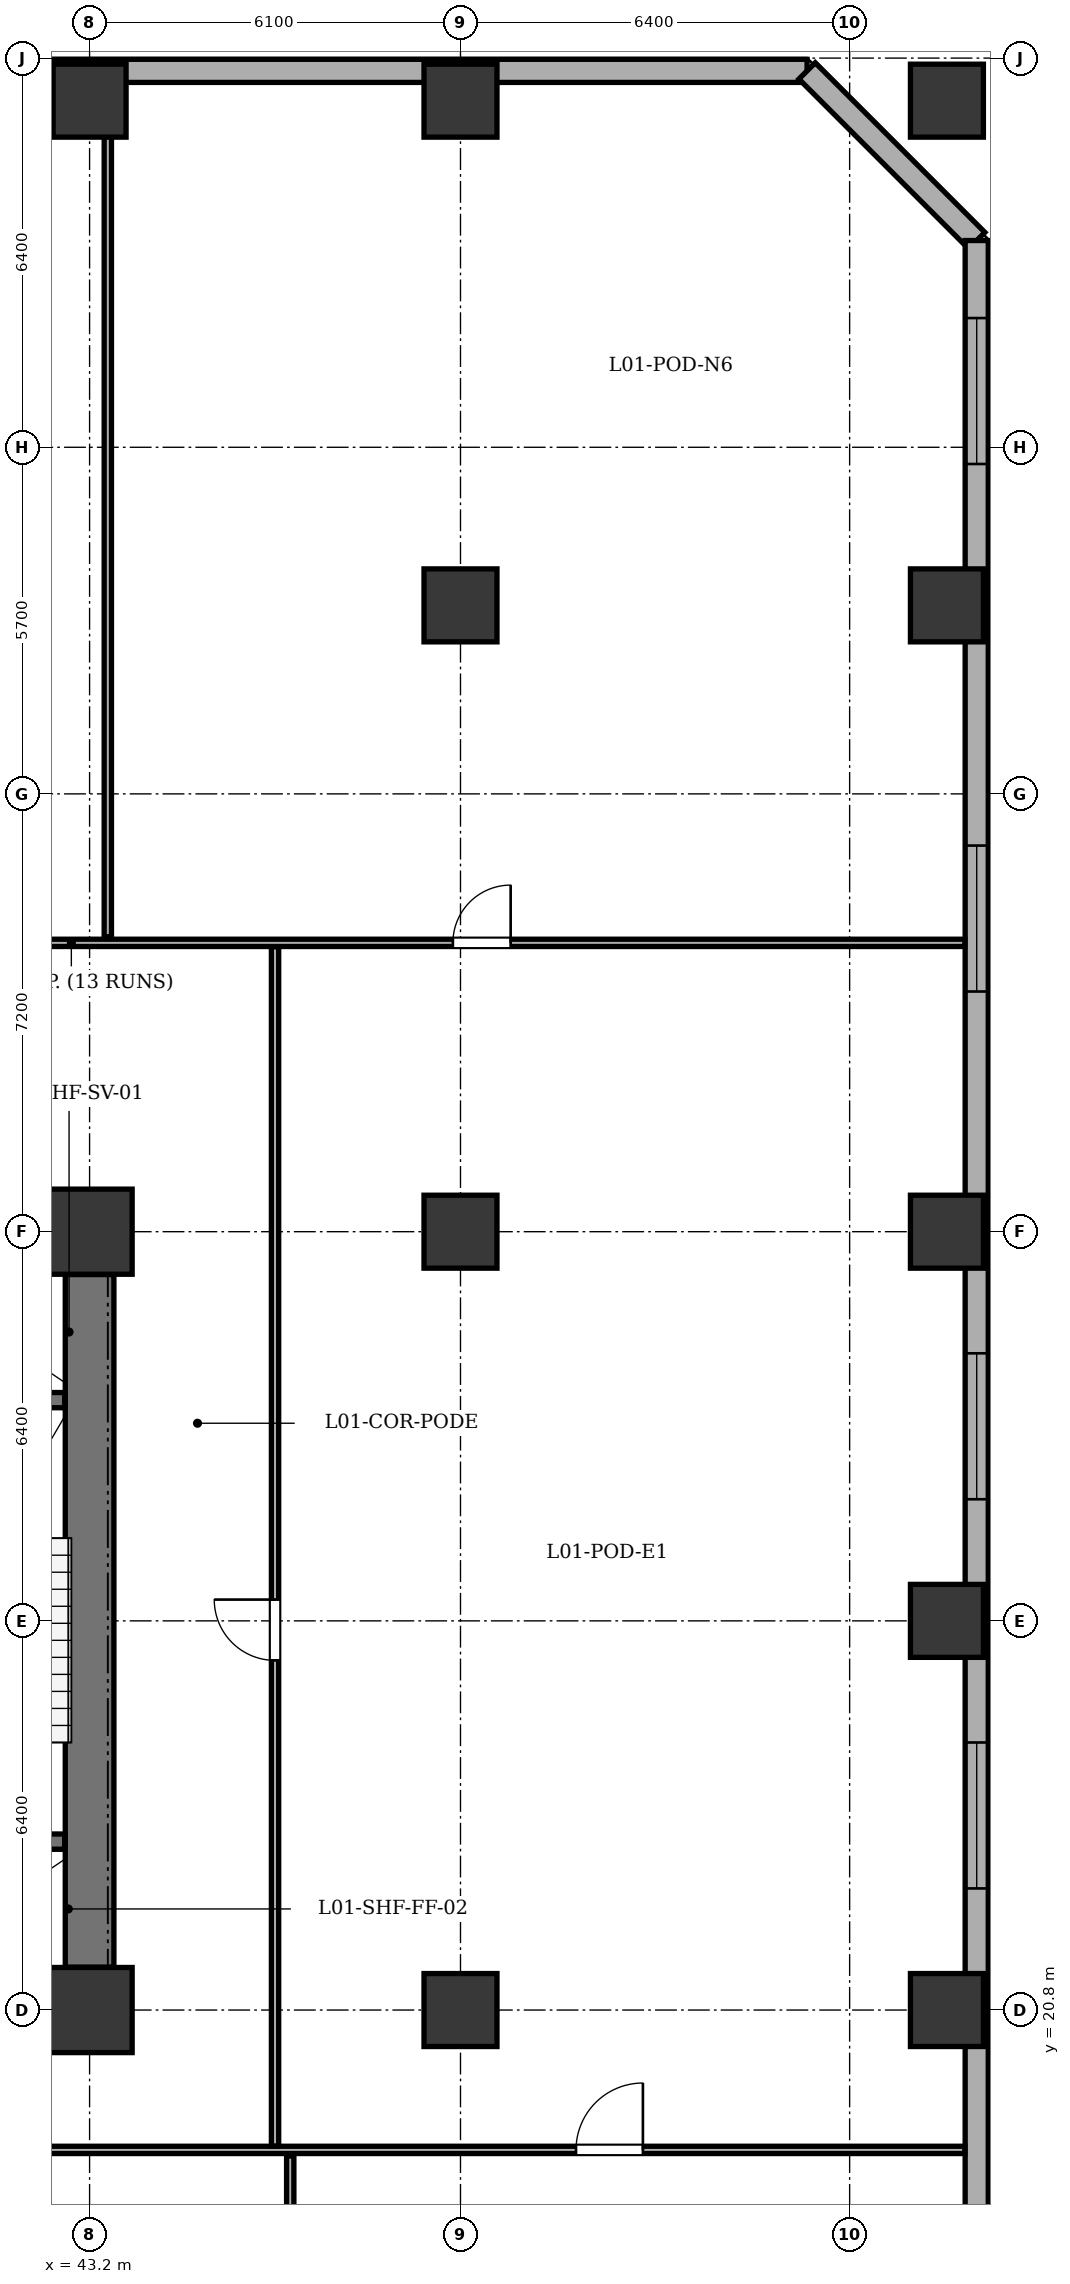
"""IFC4 building model, lengths in metres.
Left out: names, types, materials, properties, quantities, classifications, styles, units other than length and angle.
Written with IfcOpenShell. Run it as: python <this file> out.ifc"""

import sys

from ifc_helpers import new_model, si_unit, direction, frame, frame_2d, origin, origin_2d, place, context, subcontext, project, spatial, rectangle, extrude, element, fill, save


model = new_model("IFC4")
c1 = context("Model", 3, precision=1e-05, world=origin(), true_north=direction((0.0, 1.0)))
c2 = subcontext(c1, "Body", "Model", "MODEL_VIEW")
j1 = project(units=[si_unit("LENGTHUNIT", "METRE"), si_unit("PLANEANGLEUNIT", "RADIAN")], contexts=[c1])
p1 = place(None, origin())
s1 = spatial("IfcSite", under=j1, at=p1, CompositionType="ELEMENT")
p2 = place(p1, origin())
s2 = spatial("IfcBuilding", under=s1, at=p2, CompositionType="ELEMENT")
p3 = place(p2, frame((0.0, 0.0, 5.4)))
s3 = spatial("IfcBuildingStorey", under=s2, at=p3, CompositionType="ELEMENT", Elevation=5.4)
for number, where, z_axis, x_axis in (
    (1, (43.2, 20.8, 0.0), (0.0, 0.0, 1.0), (1.0, 0.0, 0.0)),
    (2, (43.2, 33.6, 0.0), (0.0, 0.0, 1.0), (1.0, 0.0, 0.0)),
):
    element("IfcColumn", number, at=place(p3, frame(where, z_axis=z_axis, x_axis=x_axis)), inside=s3, PredefinedType="COLUMN", context=c2, shape_type="SweptSolid", body=[
        extrude(rectangle(XDim=1.4, YDim=1.4, at=origin_2d()), origin(), (0.0, 0.0, 1.0), 4.5),
    ])
for number, where, z_axis, x_axis in (
    (3, (43.2, 52.2, 0.0), (0.0, 0.0, 1.0), (1.0, 0.0, 0.0)),
    (4, (49.3, 52.2, 0.0), (0.0, 0.0, 1.0), (1.0, 0.0, 0.0)),
    (5, (57.3, 52.2, 0.0), (0.0, 0.0, 1.0), (1.0, 0.0, 0.0)),
    (6, (57.3, 20.8, 0.0), (0.0, 0.0, 1.0), (1.0, 0.0, 0.0)),
    (7, (57.3, 27.2, 0.0), (0.0, 0.0, 1.0), (1.0, 0.0, 0.0)),
    (8, (57.3, 33.6, 0.0), (0.0, 0.0, 1.0), (1.0, 0.0, 0.0)),
    (9, (57.3, 43.9, 0.0), (0.0, 0.0, 1.0), (1.0, 0.0, 0.0)),
    (10, (49.3, 20.8, 0.0), (0.0, 0.0, 1.0), (1.0, 0.0, 0.0)),
    (11, (49.3, 33.6, 0.0), (0.0, 0.0, 1.0), (1.0, 0.0, 0.0)),
    (12, (49.3, 43.9, 0.0), (0.0, 0.0, 1.0), (1.0, 0.0, 0.0)),
):
    element("IfcColumn", number, at=place(p3, frame(where, z_axis=z_axis, x_axis=x_axis)), inside=s3, PredefinedType="COLUMN", context=c2, shape_type="SweptSolid", body=[
        extrude(rectangle(XDim=1.2, YDim=1.2, at=origin_2d()), origin(), (0.0, 0.0, 1.0), 4.5),
    ])
p4 = place(p3, frame((26.05, 52.69, 0.0), z_axis=(0.0, 0.0, 1.0), x_axis=(1.0, 0.0, 0.0)))
e13 = element("IfcWall", 13, at=p4, inside=s3, PredefinedType="STANDARD", context=c2, shape_type="SweptSolid", body=[
    extrude(rectangle(XDim=28.95, YDim=0.38, at=frame_2d((14.475, 0.0))), origin(), (0.0, 0.0, 1.0), 4.18),
])
p5 = place(p3, frame((55.0, 52.69, 0.0), z_axis=(0.0, 0.0, 1.0), x_axis=(0.707106781187, -0.707106781187, 0.0)))
e14 = element("IfcWall", 14, at=p5, inside=s3, PredefinedType="STANDARD", context=c2, shape_type="SweptSolid", body=[
    extrude(rectangle(XDim=3.946, YDim=0.38, at=frame_2d((1.973, 0.0))), origin(), (0.0, 0.0, 1.0), 4.18),
])
p6 = place(p3, frame((57.79, 49.9, 0.0), z_axis=(0.0, 0.0, 1.0), x_axis=(0.0, -1.0, 0.0)))
e15 = element("IfcWall", 15, at=p6, inside=s3, PredefinedType="STANDARD", context=c2, shape_type="SweptSolid", body=[
    extrude(rectangle(XDim=45.4, YDim=0.38, at=frame_2d((22.7, 0.0))), origin(), (0.0, 0.0, 1.0), 4.18),
])
p7 = place(p6, frame((1.275, 0.0, 0.75)))
e16 = element("IfcOpeningElement", 16, at=p7, cuts=e15, PredefinedType="OPENING", context=c2, shape_type="SweptSolid", body=[
    extrude(rectangle(XDim=2.4, YDim=2.1, at=frame_2d((1.2, 1.05))), frame((0.0, 0.2, 0.0), z_axis=(0.0, -1.0, 0.0), x_axis=(1.0, 0.0, 0.0)), (0.0, 0.0, 1.0), 0.4),
])
p8 = place(p6, frame((9.95, 0.0, 0.75)))
e17 = element("IfcOpeningElement", 17, at=p8, cuts=e15, PredefinedType="OPENING", context=c2, shape_type="SweptSolid", body=[
    extrude(rectangle(XDim=2.4, YDim=2.1, at=frame_2d((1.2, 1.05))), frame((0.0, 0.2, 0.0), z_axis=(0.0, -1.0, 0.0), x_axis=(1.0, 0.0, 0.0)), (0.0, 0.0, 1.0), 0.4),
])
p9 = place(p6, frame((18.3, 0.0, 0.75)))
e18 = element("IfcOpeningElement", 18, at=p9, cuts=e15, PredefinedType="OPENING", context=c2, shape_type="SweptSolid", body=[
    extrude(rectangle(XDim=2.4, YDim=2.1, at=frame_2d((1.2, 1.05))), frame((0.0, 0.2, 0.0), z_axis=(0.0, -1.0, 0.0), x_axis=(1.0, 0.0, 0.0)), (0.0, 0.0, 1.0), 0.4),
])
p10 = place(p6, frame((24.7, 0.0, 0.75)))
e19 = element("IfcOpeningElement", 19, at=p10, cuts=e15, PredefinedType="OPENING", context=c2, shape_type="SweptSolid", body=[
    extrude(rectangle(XDim=2.4, YDim=2.1, at=frame_2d((1.2, 1.05))), frame((0.0, 0.2, 0.0), z_axis=(0.0, -1.0, 0.0), x_axis=(1.0, 0.0, 0.0)), (0.0, 0.0, 1.0), 0.4),
])
p11 = place(p6, frame((33.05, 0.0, 0.75)))
e20 = element("IfcOpeningElement", 20, at=p11, cuts=e15, PredefinedType="OPENING", context=c2, shape_type="SweptSolid", body=[
    extrude(rectangle(XDim=2.4, YDim=2.1, at=frame_2d((1.2, 1.05))), frame((0.0, 0.2, 0.0), z_axis=(0.0, -1.0, 0.0), x_axis=(1.0, 0.0, 0.0)), (0.0, 0.0, 1.0), 0.4),
])
p12 = place(p6, frame((41.725, 0.0, 0.75)))
e21 = element("IfcOpeningElement", 21, at=p12, cuts=e15, PredefinedType="OPENING", context=c2, shape_type="SweptSolid", body=[
    extrude(rectangle(XDim=2.4, YDim=2.1, at=frame_2d((1.2, 1.05))), frame((0.0, 0.2, 0.0), z_axis=(0.0, -1.0, 0.0), x_axis=(1.0, 0.0, 0.0)), (0.0, 0.0, 1.0), 0.4),
])
p13 = place(p3, frame((43.2, 21.505, 0.0), z_axis=(0.0, 0.0, 1.0), x_axis=(0.0, 1.0, 0.0)))
e22 = element("IfcWall", 22, at=p13, inside=s3, PredefinedType="SHEAR", context=c2, shape_type="SweptSolid", body=[
    extrude(rectangle(XDim=11.39, YDim=0.8, at=frame_2d((5.695, 0.0))), origin(), (0.0, 0.0, 1.0), 4.18),
])
for number, where, z_axis, x_axis in (
    (23, (39.69, 23.57, 0.0), (0.0, 0.0, 1.0), (1.0, 0.0, 0.0)),
    (24, (39.69, 30.83, 0.0), (0.0, 0.0, 1.0), (1.0, 0.0, 0.0)),
):
    element("IfcWall", number, at=place(p3, frame(where, z_axis=z_axis, x_axis=x_axis)), inside=s3, PredefinedType="SHEAR", context=c2, shape_type="SweptSolid", body=[
        extrude(rectangle(XDim=3.1, YDim=0.25, at=frame_2d((1.55, 0.0))), origin(), (0.0, 0.0, 1.0), 4.18),
    ])
p14 = place(p3, frame((26.015, 18.5, 0.0), z_axis=(0.0, 0.0, 1.0), x_axis=(1.0, 0.0, 0.0)))
e25 = element("IfcWall", 25, at=p14, inside=s3, PredefinedType="PARTITIONING", context=c2, shape_type="SweptSolid", body=[
    extrude(rectangle(XDim=31.58, YDim=0.12, at=frame_2d((15.79, 0.0))), origin(), (0.0, 0.0, 1.0), 3.665),
])
p15 = place(p14, frame((4.36, 0.0, 0.0)))
e26 = element("IfcOpeningElement", 26, at=p15, cuts=e25, PredefinedType="OPENING", context=c2, shape_type="SweptSolid", body=[
    extrude(rectangle(XDim=1.1, YDim=2.15, at=frame_2d((0.55, 1.075))), frame((0.0, 0.07, 0.0), z_axis=(0.0, -1.0, 0.0), x_axis=(1.0, 0.0, 0.0)), (0.0, 0.0, 1.0), 0.14),
])
p16 = place(p14, frame((14.685, 0.0, 0.0)))
e27 = element("IfcOpeningElement", 27, at=p16, cuts=e25, PredefinedType="OPENING", context=c2, shape_type="SweptSolid", body=[
    extrude(rectangle(XDim=1.1, YDim=2.15, at=frame_2d((0.55, 1.075))), frame((0.0, 0.07, 0.0), z_axis=(0.0, -1.0, 0.0), x_axis=(1.0, 0.0, 0.0)), (0.0, 0.0, 1.0), 0.14),
])
p17 = place(p14, frame((25.185, 0.0, 0.0)))
e28 = element("IfcOpeningElement", 28, at=p17, cuts=e25, PredefinedType="OPENING", context=c2, shape_type="SweptSolid", body=[
    extrude(rectangle(XDim=1.1, YDim=2.15, at=frame_2d((0.55, 1.075))), frame((0.0, 0.07, 0.0), z_axis=(0.0, -1.0, 0.0), x_axis=(1.0, 0.0, 0.0)), (0.0, 0.0, 1.0), 0.14),
])
p18 = place(p3, frame((46.5, 1.905, 0.0), z_axis=(0.0, 0.0, 1.0), x_axis=(0.0, 1.0, 0.0)))
e29 = element("IfcWall", 29, at=p18, inside=s3, PredefinedType="PARTITIONING", context=c2, shape_type="SweptSolid", body=[
    extrude(rectangle(XDim=16.495, YDim=0.12, at=frame_2d((8.248, 0.0))), origin(), (0.0, 0.0, 1.0), 4.18),
])
p19 = place(p3, frame((2.805, 38.35, 0.0), z_axis=(0.0, 0.0, 1.0), x_axis=(1.0, 0.0, 0.0)))
e30 = element("IfcWall", 30, at=p19, inside=s3, PredefinedType="PARTITIONING", context=c2, shape_type="SweptSolid", body=[
    extrude(rectangle(XDim=54.79, YDim=0.12, at=frame_2d((27.395, 0.0))), origin(), (0.0, 0.0, 1.0), 4.18),
])
p20 = place(p19, frame((5.32, 0.0, 0.0)))
e31 = element("IfcOpeningElement", 31, at=p20, cuts=e30, PredefinedType="OPENING", context=c2, shape_type="SweptSolid", body=[
    extrude(rectangle(XDim=0.95, YDim=2.1, at=frame_2d((0.475, 1.05))), frame((0.0, 0.07, 0.0), z_axis=(0.0, -1.0, 0.0), x_axis=(1.0, 0.0, 0.0)), (0.0, 0.0, 1.0), 0.14),
])
p21 = place(p19, frame((13.87, 0.0, 0.0)))
e32 = element("IfcOpeningElement", 32, at=p21, cuts=e30, PredefinedType="OPENING", context=c2, shape_type="SweptSolid", body=[
    extrude(rectangle(XDim=0.95, YDim=2.1, at=frame_2d((0.475, 1.05))), frame((0.0, 0.07, 0.0), z_axis=(0.0, -1.0, 0.0), x_axis=(1.0, 0.0, 0.0)), (0.0, 0.0, 1.0), 0.14),
])
p22 = place(p19, frame((19.12, 0.0, 0.0)))
e33 = element("IfcOpeningElement", 33, at=p22, cuts=e30, PredefinedType="OPENING", context=c2, shape_type="SweptSolid", body=[
    extrude(rectangle(XDim=0.95, YDim=2.1, at=frame_2d((0.475, 1.05))), frame((0.0, 0.07, 0.0), z_axis=(0.0, -1.0, 0.0), x_axis=(1.0, 0.0, 0.0)), (0.0, 0.0, 1.0), 0.14),
])
p23 = place(p19, frame((23.87, 0.0, 0.0)))
e34 = element("IfcOpeningElement", 34, at=p23, cuts=e30, PredefinedType="OPENING", context=c2, shape_type="SweptSolid", body=[
    extrude(rectangle(XDim=0.95, YDim=2.1, at=frame_2d((0.475, 1.05))), frame((0.0, 0.07, 0.0), z_axis=(0.0, -1.0, 0.0), x_axis=(1.0, 0.0, 0.0)), (0.0, 0.0, 1.0), 0.14),
])
p24 = place(p19, frame((32.87, 0.0, 0.0)))
e35 = element("IfcOpeningElement", 35, at=p24, cuts=e30, PredefinedType="OPENING", context=c2, shape_type="SweptSolid", body=[
    extrude(rectangle(XDim=0.95, YDim=2.1, at=frame_2d((0.475, 1.05))), frame((0.0, 0.07, 0.0), z_axis=(0.0, -1.0, 0.0), x_axis=(1.0, 0.0, 0.0)), (0.0, 0.0, 1.0), 0.14),
])
p25 = place(p19, frame((46.37, 0.0, 0.0)))
e36 = element("IfcOpeningElement", 36, at=p25, cuts=e30, PredefinedType="OPENING", context=c2, shape_type="SweptSolid", body=[
    extrude(rectangle(XDim=0.95, YDim=2.1, at=frame_2d((0.475, 1.05))), frame((0.0, 0.07, 0.0), z_axis=(0.0, -1.0, 0.0), x_axis=(1.0, 0.0, 0.0)), (0.0, 0.0, 1.0), 0.14),
])
p26 = place(p3, frame((43.5, 38.45, 0.0), z_axis=(0.0, 0.0, 1.0), x_axis=(0.0, 1.0, 0.0)))
e37 = element("IfcWall", 37, at=p26, inside=s3, PredefinedType="PARTITIONING", context=c2, shape_type="SweptSolid", body=[
    extrude(rectangle(XDim=14.045, YDim=0.12, at=frame_2d((7.022, 0.0))), origin(), (0.0, 0.0, 1.0), 3.065),
])
p27 = place(p3, frame((46.25, 18.565, 0.0), z_axis=(0.0, 0.0, 1.0), x_axis=(0.0, 1.0, 0.0)))
e38 = element("IfcWall", 38, at=p27, inside=s3, PredefinedType="PARTITIONING", context=c2, shape_type="SweptSolid", body=[
    extrude(rectangle(XDim=19.72, YDim=0.12, at=frame_2d((9.86, 0.0))), origin(), (0.0, 0.0, 1.0), 4.18),
])
p28 = place(p27, frame((7.985, 0.0, 0.0)))
e39 = element("IfcOpeningElement", 39, at=p28, cuts=e38, PredefinedType="OPENING", context=c2, shape_type="SweptSolid", body=[
    extrude(rectangle(XDim=1.0, YDim=2.1, at=frame_2d((0.5, 1.05))), frame((0.0, 0.07, 0.0), z_axis=(0.0, -1.0, 0.0), x_axis=(1.0, 0.0, 0.0)), (0.0, 0.0, 1.0), 0.14),
])
p29 = place(p7, origin())
e40 = element("IfcWindow", 40, at=p29, inside=s3, PartitioningType="SINGLE_PANEL", PredefinedType="WINDOW", context=c2, shape_type="SweptSolid", body=[
    extrude(rectangle(XDim=2.4, YDim=2.1, at=frame_2d((1.2, 1.05))), frame((0.0, 0.03, 0.0), z_axis=(0.0, -1.0, 0.0), x_axis=(1.0, 0.0, 0.0)), (0.0, 0.0, 1.0), 0.06),
])
fill(e16, e40)
p30 = place(p8, origin())
e41 = element("IfcWindow", 41, at=p30, inside=s3, PartitioningType="SINGLE_PANEL", PredefinedType="WINDOW", context=c2, shape_type="SweptSolid", body=[
    extrude(rectangle(XDim=2.4, YDim=2.1, at=frame_2d((1.2, 1.05))), frame((0.0, 0.03, 0.0), z_axis=(0.0, -1.0, 0.0), x_axis=(1.0, 0.0, 0.0)), (0.0, 0.0, 1.0), 0.06),
])
fill(e17, e41)
p31 = place(p9, origin())
e42 = element("IfcWindow", 42, at=p31, inside=s3, PartitioningType="SINGLE_PANEL", PredefinedType="WINDOW", context=c2, shape_type="SweptSolid", body=[
    extrude(rectangle(XDim=2.4, YDim=2.1, at=frame_2d((1.2, 1.05))), frame((0.0, 0.03, 0.0), z_axis=(0.0, -1.0, 0.0), x_axis=(1.0, 0.0, 0.0)), (0.0, 0.0, 1.0), 0.06),
])
fill(e18, e42)
p32 = place(p10, origin())
e43 = element("IfcWindow", 43, at=p32, inside=s3, PartitioningType="SINGLE_PANEL", PredefinedType="WINDOW", context=c2, shape_type="SweptSolid", body=[
    extrude(rectangle(XDim=2.4, YDim=2.1, at=frame_2d((1.2, 1.05))), frame((0.0, 0.03, 0.0), z_axis=(0.0, -1.0, 0.0), x_axis=(1.0, 0.0, 0.0)), (0.0, 0.0, 1.0), 0.06),
])
fill(e19, e43)
p33 = place(p17, origin())
e44 = element("IfcDoor", 44, at=p33, inside=s3, OperationType="SINGLE_SWING_RIGHT", PredefinedType="DOOR", context=c2, shape_type="SweptSolid", body=[
    extrude(rectangle(XDim=1.1, YDim=2.15, at=frame_2d((0.55, 1.075))), frame((0.0, 0.025, 0.0), z_axis=(0.0, -1.0, 0.0), x_axis=(1.0, 0.0, 0.0)), (0.0, 0.0, 1.0), 0.05),
])
fill(e28, e44)
p34 = place(p25, origin())
e45 = element("IfcDoor", 45, at=p34, inside=s3, OperationType="SINGLE_SWING_RIGHT", PredefinedType="DOOR", context=c2, shape_type="SweptSolid", body=[
    extrude(rectangle(XDim=0.95, YDim=2.1, at=frame_2d((0.475, 1.05))), frame((0.0, 0.025, 0.0), z_axis=(0.0, -1.0, 0.0), x_axis=(1.0, 0.0, 0.0)), (0.0, 0.0, 1.0), 0.05),
])
fill(e36, e45)
p35 = place(p28, origin())
e46 = element("IfcDoor", 46, at=p35, inside=s3, OperationType="SINGLE_SWING_RIGHT", PredefinedType="DOOR", context=c2, shape_type="SweptSolid", body=[
    extrude(rectangle(XDim=1.0, YDim=2.1, at=frame_2d((0.5, 1.05))), frame((0.0, 0.025, 0.0), z_axis=(0.0, -1.0, 0.0), x_axis=(1.0, 0.0, 0.0)), (0.0, 0.0, 1.0), 0.05),
])
fill(e39, e46)
save(model, sys.argv[1])
